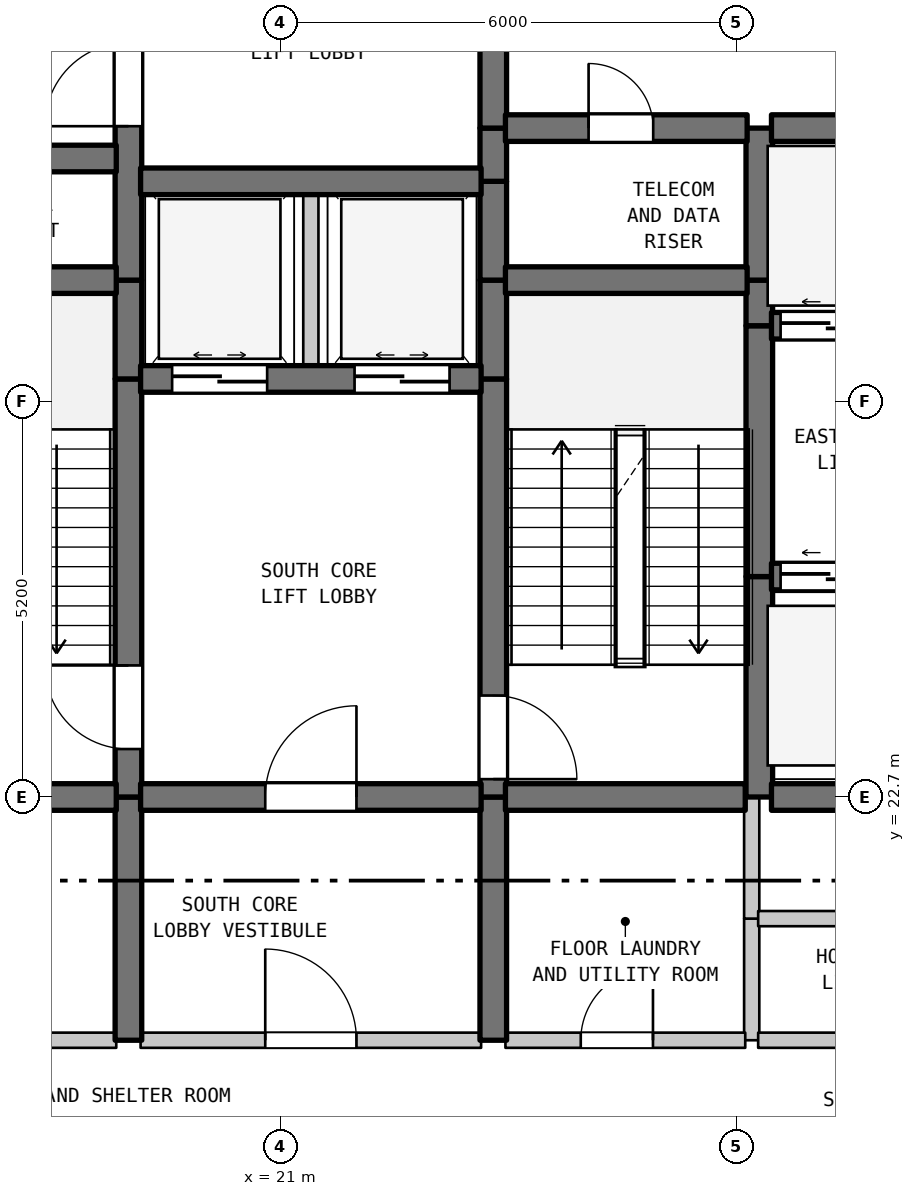
"""IFC4 building model, lengths in metres.
Left out: names, types, materials, properties, quantities, classifications, styles, units other than length and angle.
Written with IfcOpenShell. Run it as: python <this file> out.ifc"""

import sys

from ifc_helpers import new_model, si_unit, direction, frame, frame_2d, origin, place, context, subcontext, project, spatial, rectangle, extrude, element, fill, save


model = new_model("IFC4")
c1 = context("Model", 3, precision=1e-05, world=origin(), true_north=direction((0.0, 1.0)))
c2 = subcontext(c1, "Body", "Model", "MODEL_VIEW")
j1 = project(units=[si_unit("LENGTHUNIT", "METRE"), si_unit("PLANEANGLEUNIT", "RADIAN")], contexts=[c1])
p1 = place(None, origin())
s1 = spatial("IfcSite", under=j1, at=p1, CompositionType="ELEMENT")
p2 = place(p1, origin())
s2 = spatial("IfcBuilding", under=s1, at=p2, CompositionType="ELEMENT")
p3 = place(p2, frame((0.0, 0.0, 218.0)))
s3 = spatial("IfcBuildingStorey", under=s2, at=p3, CompositionType="ELEMENT", Elevation=218.0)
p4 = place(p3, frame((19.0, 19.5, 0.0), z_axis=(0.0, 0.0, 1.0), x_axis=(0.0, 1.0, 0.0)))
e1 = element("IfcWall", 1, at=p4, inside=s3, PredefinedType="SHEAR", context=c2, shape_type="SweptSolid", body=[
    extrude(rectangle(XDim=3.2, YDim=0.35, at=frame_2d((1.6, 0.0))), origin(), (0.0, 0.0, 1.0), 4.49),
])
p5 = place(p3, frame((19.0, 22.7, 0.0), z_axis=(0.0, 0.0, 1.0), x_axis=(0.0, 1.0, 0.0)))
e2 = element("IfcWall", 2, at=p5, inside=s3, PredefinedType="SHEAR", context=c2, shape_type="SweptSolid", body=[
    extrude(rectangle(XDim=5.5, YDim=0.35, at=frame_2d((2.75, 0.0))), origin(), (0.0, 0.0, 1.0), 4.49),
])
p6 = place(p5, frame((0.631, 0.0, 0.0)))
e3 = element("IfcOpeningElement", 3, at=p6, cuts=e2, PredefinedType="OPENING", context=c2, shape_type="SweptSolid", body=[
    extrude(rectangle(XDim=1.1, YDim=2.15, at=frame_2d((0.55, 1.075))), frame((0.0, 0.185, 0.0), z_axis=(0.0, -1.0, 0.0), x_axis=(1.0, 0.0, 0.0)), (0.0, 0.0, 1.0), 0.37),
])
p7 = place(p3, frame((19.0, 28.2, 0.0), z_axis=(0.0, 0.0, 1.0), x_axis=(0.0, 1.0, 0.0)))
e4 = element("IfcWall", 4, at=p7, inside=s3, PredefinedType="SHEAR", context=c2, shape_type="SweptSolid", body=[
    extrude(rectangle(XDim=1.3, YDim=0.35, at=frame_2d((0.65, 0.0))), origin(), (0.0, 0.0, 1.0), 4.49),
])
p8 = place(p3, frame((19.0, 29.5, 0.0), z_axis=(0.0, 0.0, 1.0), x_axis=(0.0, 1.0, 0.0)))
e5 = element("IfcWall", 5, at=p8, inside=s3, PredefinedType="SHEAR", context=c2, shape_type="SweptSolid", body=[
    extrude(rectangle(XDim=5.5, YDim=0.35, at=frame_2d((2.75, 0.0))), origin(), (0.0, 0.0, 1.0), 4.49),
])
p9 = place(p8, frame((2.025, 0.0, 0.0)))
e6 = element("IfcOpeningElement", 6, at=p9, cuts=e5, PredefinedType="OPENING", context=c2, shape_type="SweptSolid", body=[
    extrude(rectangle(XDim=1.1, YDim=2.15, at=frame_2d((0.55, 1.075))), frame((0.0, 0.185, 0.0), z_axis=(0.0, -1.0, 0.0), x_axis=(1.0, 0.0, 0.0)), (0.0, 0.0, 1.0), 0.37),
])
p10 = place(p3, frame((21.4, 28.2, 0.0), z_axis=(0.0, 0.0, 1.0), x_axis=(0.0, 1.0, 0.0)))
e7 = element("IfcWall", 7, at=p10, inside=s3, PredefinedType="STANDARD", context=c2, shape_type="SweptSolid", body=[
    extrude(rectangle(XDim=2.6, YDim=0.2, at=frame_2d((1.3, 0.0))), origin(), (0.0, 0.0, 1.0), 4.49),
])
p11 = place(p3, frame((23.8, 19.5, 0.0), z_axis=(0.0, 0.0, 1.0), x_axis=(0.0, 1.0, 0.0)))
e8 = element("IfcWall", 8, at=p11, inside=s3, PredefinedType="SHEAR", context=c2, shape_type="SweptSolid", body=[
    extrude(rectangle(XDim=3.2, YDim=0.35, at=frame_2d((1.6, 0.0))), origin(), (0.0, 0.0, 1.0), 4.49),
])
p12 = place(p3, frame((23.8, 22.7, 0.0), z_axis=(0.0, 0.0, 1.0), x_axis=(0.0, 1.0, 0.0)))
e9 = element("IfcWall", 9, at=p12, inside=s3, PredefinedType="SHEAR", context=c2, shape_type="SweptSolid", body=[
    extrude(rectangle(XDim=5.5, YDim=0.35, at=frame_2d((2.75, 0.0))), origin(), (0.0, 0.0, 1.0), 4.49),
])
p13 = place(p12, frame((0.235, 0.0, 0.0)))
e10 = element("IfcOpeningElement", 10, at=p13, cuts=e9, PredefinedType="OPENING", context=c2, shape_type="SweptSolid", body=[
    extrude(rectangle(XDim=1.1, YDim=2.15, at=frame_2d((0.55, 1.075))), frame((0.0, 0.185, 0.0), z_axis=(0.0, -1.0, 0.0), x_axis=(1.0, 0.0, 0.0)), (0.0, 0.0, 1.0), 0.37),
])
for number, where, z_axis, x_axis in (
    (11, (23.8, 28.2, 0.0), (0.0, 0.0, 1.0), (0.0, 1.0, 0.0)),
    (12, (23.8, 29.5, 0.0), (0.0, 0.0, 1.0), (0.0, 1.0, 0.0)),
):
    element("IfcWall", number, at=place(p3, frame(where, z_axis=z_axis, x_axis=x_axis)), inside=s3, PredefinedType="SHEAR", context=c2, shape_type="SweptSolid", body=[
        extrude(rectangle(XDim=1.3, YDim=0.35, at=frame_2d((0.65, 0.0))), origin(), (0.0, 0.0, 1.0), 4.49),
    ])
p14 = place(p3, frame((23.8, 30.8, 0.0), z_axis=(0.0, 0.0, 1.0), x_axis=(0.0, 1.0, 0.0)))
e13 = element("IfcWall", 13, at=p14, inside=s3, PredefinedType="SHEAR", context=c2, shape_type="SweptSolid", body=[
    extrude(rectangle(XDim=0.7, YDim=0.35, at=frame_2d((0.35, 0.0))), origin(), (0.0, 0.0, 1.0), 4.49),
])
p15 = place(p3, frame((23.8, 31.5, 0.0), z_axis=(0.0, 0.0, 1.0), x_axis=(0.0, 1.0, 0.0)))
e14 = element("IfcWall", 14, at=p15, inside=s3, PredefinedType="SHEAR", context=c2, shape_type="SweptSolid", body=[
    extrude(rectangle(XDim=3.5, YDim=0.35, at=frame_2d((1.75, 0.0))), origin(), (0.0, 0.0, 1.0), 4.49),
])
p16 = place(p15, frame((1.127, 0.0, 0.0)))
e15 = element("IfcOpeningElement", 15, at=p16, cuts=e14, PredefinedType="OPENING", context=c2, shape_type="SweptSolid", body=[
    extrude(rectangle(XDim=1.1, YDim=2.15, at=frame_2d((0.55, 1.075))), frame((0.0, 0.185, 0.0), z_axis=(0.0, -1.0, 0.0), x_axis=(1.0, 0.0, 0.0)), (0.0, 0.0, 1.0), 0.37),
])
p17 = place(p3, frame((27.2, 19.5, 0.0), z_axis=(0.0, 0.0, 1.0), x_axis=(0.0, 1.0, 0.0)))
e16 = element("IfcWall", 16, at=p17, inside=s3, PredefinedType="STANDARD", context=c2, shape_type="SweptSolid", body=[
    extrude(rectangle(XDim=1.6, YDim=0.2, at=frame_2d((0.8, 0.0))), origin(), (0.0, 0.0, 1.0), 4.49),
])
p18 = place(p3, frame((27.2, 21.1, 0.0), z_axis=(0.0, 0.0, 1.0), x_axis=(0.0, 1.0, 0.0)))
e17 = element("IfcWall", 17, at=p18, inside=s3, PredefinedType="STANDARD", context=c2, shape_type="SweptSolid", body=[
    extrude(rectangle(XDim=1.6, YDim=0.2, at=frame_2d((0.8, 0.0))), origin(), (0.0, 0.0, 1.0), 4.49),
])
p19 = place(p3, frame((27.3, 22.7, 0.0), z_axis=(0.0, 0.0, 1.0), x_axis=(0.0, 1.0, 0.0)))
e18 = element("IfcWall", 18, at=p19, inside=s3, PredefinedType="SHEAR", context=c2, shape_type="SweptSolid", body=[
    extrude(rectangle(XDim=2.9, YDim=0.35, at=frame_2d((1.45, 0.0))), origin(), (0.0, 0.0, 1.0), 4.49),
])
p20 = place(p3, frame((27.3, 25.6, 0.0), z_axis=(0.0, 0.0, 1.0), x_axis=(0.0, 1.0, 0.0)))
e19 = element("IfcWall", 19, at=p20, inside=s3, PredefinedType="SHEAR", context=c2, shape_type="SweptSolid", body=[
    extrude(rectangle(XDim=3.3, YDim=0.35, at=frame_2d((1.65, 0.0))), origin(), (0.0, 0.0, 1.0), 4.49),
])
p21 = place(p3, frame((27.3, 28.9, 0.0), z_axis=(0.0, 0.0, 1.0), x_axis=(0.0, 1.0, 0.0)))
e20 = element("IfcWall", 20, at=p21, inside=s3, PredefinedType="SHEAR", context=c2, shape_type="SweptSolid", body=[
    extrude(rectangle(XDim=0.6, YDim=0.35, at=frame_2d((0.3, 0.0))), origin(), (0.0, 0.0, 1.0), 4.49),
])
p22 = place(p3, frame((27.3, 29.5, 0.0), z_axis=(0.0, 0.0, 1.0), x_axis=(0.0, 1.0, 0.0)))
e21 = element("IfcWall", 21, at=p22, inside=s3, PredefinedType="SHEAR", context=c2, shape_type="SweptSolid", body=[
    extrude(rectangle(XDim=2.0, YDim=0.35, at=frame_2d((1.0, 0.0))), origin(), (0.0, 0.0, 1.0), 4.49),
])
p23 = place(p3, frame((15.16, 19.5, 0.0), z_axis=(0.0, 0.0, 1.0), x_axis=(1.0, 0.0, 0.0)))
e22 = element("IfcWall", 22, at=p23, inside=s3, PredefinedType="STANDARD", context=c2, shape_type="SweptSolid", body=[
    extrude(rectangle(XDim=3.68, YDim=0.2, at=frame_2d((1.84, 0.0))), origin(), (0.0, 0.0, 1.0), 4.49),
])
p24 = place(p23, frame((1.39, 0.0, 0.0)))
e23 = element("IfcOpeningElement", 23, at=p24, cuts=e22, PredefinedType="OPENING", context=c2, shape_type="SweptSolid", body=[
    extrude(rectangle(XDim=0.9, YDim=2.15, at=frame_2d((0.45, 1.075))), frame((0.0, 0.11, 0.0), z_axis=(0.0, -1.0, 0.0), x_axis=(1.0, 0.0, 0.0)), (0.0, 0.0, 1.0), 0.22),
])
p25 = place(p3, frame((19.16, 19.5, 0.0), z_axis=(0.0, 0.0, 1.0), x_axis=(1.0, 0.0, 0.0)))
e24 = element("IfcWall", 24, at=p25, inside=s3, PredefinedType="STANDARD", context=c2, shape_type="SweptSolid", body=[
    extrude(rectangle(XDim=4.48, YDim=0.2, at=frame_2d((2.24, 0.0))), origin(), (0.0, 0.0, 1.0), 4.49),
])
p26 = place(p25, frame((1.64, 0.0, 0.0)))
e25 = element("IfcOpeningElement", 25, at=p26, cuts=e24, PredefinedType="OPENING", context=c2, shape_type="SweptSolid", body=[
    extrude(rectangle(XDim=1.2, YDim=2.2, at=frame_2d((0.6, 1.1))), frame((0.0, 0.11, 0.0), z_axis=(0.0, -1.0, 0.0), x_axis=(1.0, 0.0, 0.0)), (0.0, 0.0, 1.0), 0.22),
])
p27 = place(p3, frame((23.96, 19.5, 0.0), z_axis=(0.0, 0.0, 1.0), x_axis=(1.0, 0.0, 0.0)))
e26 = element("IfcWall", 26, at=p27, inside=s3, PredefinedType="STANDARD", context=c2, shape_type="SweptSolid", body=[
    extrude(rectangle(XDim=3.155, YDim=0.2, at=frame_2d((1.578, 0.0))), origin(), (0.0, 0.0, 1.0), 4.49),
])
p28 = place(p27, frame((0.991, 0.0, 0.0)))
e27 = element("IfcOpeningElement", 27, at=p28, cuts=e26, PredefinedType="OPENING", context=c2, shape_type="SweptSolid", body=[
    extrude(rectangle(XDim=0.95, YDim=2.15, at=frame_2d((0.475, 1.075))), frame((0.0, 0.11, 0.0), z_axis=(0.0, -1.0, 0.0), x_axis=(1.0, 0.0, 0.0)), (0.0, 0.0, 1.0), 0.22),
])
p29 = place(p3, frame((27.285, 19.5, 0.0), z_axis=(0.0, 0.0, 1.0), x_axis=(1.0, 0.0, 0.0)))
e28 = element("IfcWall", 28, at=p29, inside=s3, PredefinedType="STANDARD", context=c2, shape_type="SweptSolid", body=[
    extrude(rectangle(XDim=3.43, YDim=0.2, at=frame_2d((1.715, 0.0))), origin(), (0.0, 0.0, 1.0), 4.49),
])
p30 = place(p29, frame((1.192, 0.0, 0.0)))
e29 = element("IfcOpeningElement", 29, at=p30, cuts=e28, PredefinedType="OPENING", context=c2, shape_type="SweptSolid", body=[
    extrude(rectangle(XDim=0.9, YDim=2.15, at=frame_2d((0.45, 1.075))), frame((0.0, 0.11, 0.0), z_axis=(0.0, -1.0, 0.0), x_axis=(1.0, 0.0, 0.0)), (0.0, 0.0, 1.0), 0.22),
])
p31 = place(p3, frame((27.285, 21.1, 0.0), z_axis=(0.0, 0.0, 1.0), x_axis=(1.0, 0.0, 0.0)))
e30 = element("IfcWall", 30, at=p31, inside=s3, PredefinedType="STANDARD", context=c2, shape_type="SweptSolid", body=[
    extrude(rectangle(XDim=3.355, YDim=0.2, at=frame_2d((1.677, 0.0))), origin(), (0.0, 0.0, 1.0), 4.49),
])
p32 = place(p3, frame((15.16, 22.7, 0.0), z_axis=(0.0, 0.0, 1.0), x_axis=(1.0, 0.0, 0.0)))
e31 = element("IfcWall", 31, at=p32, inside=s3, PredefinedType="SHEAR", context=c2, shape_type="SweptSolid", body=[
    extrude(rectangle(XDim=3.68, YDim=0.35, at=frame_2d((1.84, 0.0))), origin(), (0.0, 0.0, 1.0), 4.49),
])
p33 = place(p3, frame((19.16, 22.7, 0.0), z_axis=(0.0, 0.0, 1.0), x_axis=(1.0, 0.0, 0.0)))
e32 = element("IfcWall", 32, at=p33, inside=s3, PredefinedType="SHEAR", context=c2, shape_type="SweptSolid", body=[
    extrude(rectangle(XDim=4.48, YDim=0.35, at=frame_2d((2.24, 0.0))), origin(), (0.0, 0.0, 1.0), 4.49),
])
p34 = place(p33, frame((1.64, 0.0, 0.0)))
e33 = element("IfcOpeningElement", 33, at=p34, cuts=e32, PredefinedType="OPENING", context=c2, shape_type="SweptSolid", body=[
    extrude(rectangle(XDim=1.2, YDim=2.2, at=frame_2d((0.6, 1.1))), frame((0.0, 0.185, 0.0), z_axis=(0.0, -1.0, 0.0), x_axis=(1.0, 0.0, 0.0)), (0.0, 0.0, 1.0), 0.37),
])
p35 = place(p3, frame((23.96, 22.7, 0.0), z_axis=(0.0, 0.0, 1.0), x_axis=(1.0, 0.0, 0.0)))
e34 = element("IfcWall", 34, at=p35, inside=s3, PredefinedType="SHEAR", context=c2, shape_type="SweptSolid", body=[
    extrude(rectangle(XDim=3.155, YDim=0.35, at=frame_2d((1.578, 0.0))), origin(), (0.0, 0.0, 1.0), 4.49),
])
p36 = place(p3, frame((27.46, 22.7, 0.0), z_axis=(0.0, 0.0, 1.0), x_axis=(1.0, 0.0, 0.0)))
e35 = element("IfcWall", 35, at=p36, inside=s3, PredefinedType="SHEAR", context=c2, shape_type="SweptSolid", body=[
    extrude(rectangle(XDim=3.18, YDim=0.35, at=frame_2d((1.59, 0.0))), origin(), (0.0, 0.0, 1.0), 4.49),
])
p37 = place(p3, frame((27.46, 25.6, 0.0), z_axis=(0.0, 0.0, 1.0), x_axis=(1.0, 0.0, 0.0)))
e36 = element("IfcWall", 36, at=p37, inside=s3, PredefinedType="SHEAR", context=c2, shape_type="SweptSolid", body=[
    extrude(rectangle(XDim=3.18, YDim=0.35, at=frame_2d((1.59, 0.0))), origin(), (0.0, 0.0, 1.0), 4.49),
])
p38 = place(p37, frame((0.12, 0.0, 0.0)))
e37 = element("IfcOpeningElement", 37, at=p38, cuts=e36, PredefinedType="OPENING", context=c2, shape_type="SweptSolid", body=[
    extrude(rectangle(XDim=1.25, YDim=2.2, at=frame_2d((0.625, 1.1))), frame((0.0, 0.185, 0.0), z_axis=(0.0, -1.0, 0.0), x_axis=(1.0, 0.0, 0.0)), (0.0, 0.0, 1.0), 0.37),
])
p39 = place(p37, frame((1.81, 0.0, 0.0)))
e38 = element("IfcOpeningElement", 38, at=p39, cuts=e36, PredefinedType="OPENING", context=c2, shape_type="SweptSolid", body=[
    extrude(rectangle(XDim=1.25, YDim=2.2, at=frame_2d((0.625, 1.1))), frame((0.0, 0.185, 0.0), z_axis=(0.0, -1.0, 0.0), x_axis=(1.0, 0.0, 0.0)), (0.0, 0.0, 1.0), 0.37),
])
p40 = place(p3, frame((19.16, 28.2, 0.0), z_axis=(0.0, 0.0, 1.0), x_axis=(1.0, 0.0, 0.0)))
e39 = element("IfcWall", 39, at=p40, inside=s3, PredefinedType="SHEAR", context=c2, shape_type="SweptSolid", body=[
    extrude(rectangle(XDim=4.48, YDim=0.35, at=frame_2d((2.24, 0.0))), origin(), (0.0, 0.0, 1.0), 4.49),
])
p41 = place(p40, frame((0.415, 0.0, 0.0)))
e40 = element("IfcOpeningElement", 40, at=p41, cuts=e39, PredefinedType="OPENING", context=c2, shape_type="SweptSolid", body=[
    extrude(rectangle(XDim=1.25, YDim=2.2, at=frame_2d((0.625, 1.1))), frame((0.0, 0.185, 0.0), z_axis=(0.0, -1.0, 0.0), x_axis=(1.0, 0.0, 0.0)), (0.0, 0.0, 1.0), 0.37),
])
p42 = place(p40, frame((2.815, 0.0, 0.0)))
e41 = element("IfcOpeningElement", 41, at=p42, cuts=e39, PredefinedType="OPENING", context=c2, shape_type="SweptSolid", body=[
    extrude(rectangle(XDim=1.25, YDim=2.2, at=frame_2d((0.625, 1.1))), frame((0.0, 0.185, 0.0), z_axis=(0.0, -1.0, 0.0), x_axis=(1.0, 0.0, 0.0)), (0.0, 0.0, 1.0), 0.37),
])
p43 = place(p3, frame((27.46, 28.9, 0.0), z_axis=(0.0, 0.0, 1.0), x_axis=(1.0, 0.0, 0.0)))
e42 = element("IfcWall", 42, at=p43, inside=s3, PredefinedType="SHEAR", context=c2, shape_type="SweptSolid", body=[
    extrude(rectangle(XDim=3.18, YDim=0.35, at=frame_2d((1.59, 0.0))), origin(), (0.0, 0.0, 1.0), 4.49),
])
p44 = place(p43, frame((0.12, 0.0, 0.0)))
e43 = element("IfcOpeningElement", 43, at=p44, cuts=e42, PredefinedType="OPENING", context=c2, shape_type="SweptSolid", body=[
    extrude(rectangle(XDim=1.25, YDim=2.2, at=frame_2d((0.625, 1.1))), frame((0.0, 0.185, 0.0), z_axis=(0.0, -1.0, 0.0), x_axis=(1.0, 0.0, 0.0)), (0.0, 0.0, 1.0), 0.37),
])
p45 = place(p43, frame((1.81, 0.0, 0.0)))
e44 = element("IfcOpeningElement", 44, at=p45, cuts=e42, PredefinedType="OPENING", context=c2, shape_type="SweptSolid", body=[
    extrude(rectangle(XDim=1.25, YDim=2.2, at=frame_2d((0.625, 1.1))), frame((0.0, 0.185, 0.0), z_axis=(0.0, -1.0, 0.0), x_axis=(1.0, 0.0, 0.0)), (0.0, 0.0, 1.0), 0.37),
])
p46 = place(p3, frame((15.16, 29.5, 0.0), z_axis=(0.0, 0.0, 1.0), x_axis=(1.0, 0.0, 0.0)))
e45 = element("IfcWall", 45, at=p46, inside=s3, PredefinedType="SHEAR", context=c2, shape_type="SweptSolid", body=[
    extrude(rectangle(XDim=3.68, YDim=0.35, at=frame_2d((1.84, 0.0))), origin(), (0.0, 0.0, 1.0), 4.49),
])
p47 = place(p3, frame((23.96, 29.5, 0.0), z_axis=(0.0, 0.0, 1.0), x_axis=(1.0, 0.0, 0.0)))
e46 = element("IfcWall", 46, at=p47, inside=s3, PredefinedType="SHEAR", context=c2, shape_type="SweptSolid", body=[
    extrude(rectangle(XDim=3.18, YDim=0.35, at=frame_2d((1.59, 0.0))), origin(), (0.0, 0.0, 1.0), 4.49),
])
p48 = place(p3, frame((19.16, 30.8, 0.0), z_axis=(0.0, 0.0, 1.0), x_axis=(1.0, 0.0, 0.0)))
e47 = element("IfcWall", 47, at=p48, inside=s3, PredefinedType="SHEAR", context=c2, shape_type="SweptSolid", body=[
    extrude(rectangle(XDim=4.48, YDim=0.35, at=frame_2d((2.24, 0.0))), origin(), (0.0, 0.0, 1.0), 4.49),
])
p49 = place(p3, frame((15.16, 31.1, 0.0), z_axis=(0.0, 0.0, 1.0), x_axis=(1.0, 0.0, 0.0)))
e48 = element("IfcWall", 48, at=p49, inside=s3, PredefinedType="SHEAR", context=c2, shape_type="SweptSolid", body=[
    extrude(rectangle(XDim=3.68, YDim=0.35, at=frame_2d((1.84, 0.0))), origin(), (0.0, 0.0, 1.0), 4.49),
])
p50 = place(p3, frame((23.96, 31.5, 0.0), z_axis=(0.0, 0.0, 1.0), x_axis=(1.0, 0.0, 0.0)))
e49 = element("IfcWall", 49, at=p50, inside=s3, PredefinedType="SHEAR", context=c2, shape_type="SweptSolid", body=[
    extrude(rectangle(XDim=3.18, YDim=0.35, at=frame_2d((1.59, 0.0))), origin(), (0.0, 0.0, 1.0), 4.49),
])
p51 = place(p50, frame((1.094, 0.0, 0.0)))
e50 = element("IfcOpeningElement", 50, at=p51, cuts=e49, PredefinedType="OPENING", context=c2, shape_type="SweptSolid", body=[
    extrude(rectangle(XDim=0.85, YDim=2.1, at=frame_2d((0.425, 1.05))), frame((0.0, 0.185, 0.0), z_axis=(0.0, -1.0, 0.0), x_axis=(1.0, 0.0, 0.0)), (0.0, 0.0, 1.0), 0.37),
])
p52 = place(p3, frame((27.46, 31.5, 0.0), z_axis=(0.0, 0.0, 1.0), x_axis=(1.0, 0.0, 0.0)))
e51 = element("IfcWall", 51, at=p52, inside=s3, PredefinedType="SHEAR", context=c2, shape_type="SweptSolid", body=[
    extrude(rectangle(XDim=3.18, YDim=0.35, at=frame_2d((1.59, 0.0))), origin(), (0.0, 0.0, 1.0), 4.49),
])
p53 = place(p6, origin())
e52 = element("IfcDoor", 52, at=p53, inside=s3, OperationType="SINGLE_SWING_RIGHT", PredefinedType="DOOR", context=c2, shape_type="SweptSolid", body=[
    extrude(rectangle(XDim=1.1, YDim=2.15, at=frame_2d((0.55, 1.075))), frame((0.0, 0.025, 0.0), z_axis=(0.0, -1.0, 0.0), x_axis=(1.0, 0.0, 0.0)), (0.0, 0.0, 1.0), 0.05),
])
fill(e3, e52)
p54 = place(p9, origin())
e53 = element("IfcDoor", 53, at=p54, inside=s3, OperationType="SINGLE_SWING_LEFT", PredefinedType="DOOR", context=c2, shape_type="SweptSolid", body=[
    extrude(rectangle(XDim=1.1, YDim=2.15, at=frame_2d((0.55, 1.075))), frame((0.0, 0.025, 0.0), z_axis=(0.0, -1.0, 0.0), x_axis=(1.0, 0.0, 0.0)), (0.0, 0.0, 1.0), 0.05),
])
fill(e6, e53)
p55 = place(p13, frame((1.1, 0.0, 0.0), z_axis=(0.0, 0.0, 1.0), x_axis=(-1.0, 0.0, 0.0)))
e54 = element("IfcDoor", 54, at=p55, inside=s3, OperationType="SINGLE_SWING_LEFT", PredefinedType="DOOR", context=c2, shape_type="SweptSolid", body=[
    extrude(rectangle(XDim=1.1, YDim=2.15, at=frame_2d((0.55, 1.075))), frame((0.0, 0.025, 0.0), z_axis=(0.0, -1.0, 0.0), x_axis=(1.0, 0.0, 0.0)), (0.0, 0.0, 1.0), 0.05),
])
fill(e10, e54)
p56 = place(p26, origin())
e55 = element("IfcDoor", 55, at=p56, inside=s3, OperationType="SINGLE_SWING_LEFT", PredefinedType="DOOR", context=c2, shape_type="SweptSolid", body=[
    extrude(rectangle(XDim=1.2, YDim=2.2, at=frame_2d((0.6, 1.1))), frame((0.0, 0.025, 0.0), z_axis=(0.0, -1.0, 0.0), x_axis=(1.0, 0.0, 0.0)), (0.0, 0.0, 1.0), 0.05),
])
fill(e25, e55)
p57 = place(p28, origin())
e56 = element("IfcDoor", 56, at=p57, inside=s3, OperationType="SINGLE_SWING_RIGHT", PredefinedType="DOOR", context=c2, shape_type="SweptSolid", body=[
    extrude(rectangle(XDim=0.95, YDim=2.15, at=frame_2d((0.475, 1.075))), frame((0.0, 0.025, 0.0), z_axis=(0.0, -1.0, 0.0), x_axis=(1.0, 0.0, 0.0)), (0.0, 0.0, 1.0), 0.05),
])
fill(e27, e56)
p58 = place(p34, origin())
e57 = element("IfcDoor", 57, at=p58, inside=s3, OperationType="SINGLE_SWING_RIGHT", PredefinedType="DOOR", context=c2, shape_type="SweptSolid", body=[
    extrude(rectangle(XDim=1.2, YDim=2.2, at=frame_2d((0.6, 1.1))), frame((0.0, 0.025, 0.0), z_axis=(0.0, -1.0, 0.0), x_axis=(1.0, 0.0, 0.0)), (0.0, 0.0, 1.0), 0.05),
])
fill(e33, e57)
p59 = place(p38, origin())
e58 = element("IfcDoor", 58, at=p59, inside=s3, OperationType="DOUBLE_DOOR_SLIDING", PredefinedType="DOOR", context=c2, shape_type="SweptSolid", body=[
    extrude(rectangle(XDim=1.25, YDim=2.2, at=frame_2d((0.625, 1.1))), frame((0.0, 0.025, 0.0), z_axis=(0.0, -1.0, 0.0), x_axis=(1.0, 0.0, 0.0)), (0.0, 0.0, 1.0), 0.05),
])
fill(e37, e58)
p60 = place(p41, origin())
e59 = element("IfcDoor", 59, at=p60, inside=s3, OperationType="DOUBLE_DOOR_SLIDING", PredefinedType="DOOR", context=c2, shape_type="SweptSolid", body=[
    extrude(rectangle(XDim=1.25, YDim=2.2, at=frame_2d((0.625, 1.1))), frame((0.0, 0.025, 0.0), z_axis=(0.0, -1.0, 0.0), x_axis=(1.0, 0.0, 0.0)), (0.0, 0.0, 1.0), 0.05),
])
fill(e40, e59)
p61 = place(p42, origin())
e60 = element("IfcDoor", 60, at=p61, inside=s3, OperationType="DOUBLE_DOOR_SLIDING", PredefinedType="DOOR", context=c2, shape_type="SweptSolid", body=[
    extrude(rectangle(XDim=1.25, YDim=2.2, at=frame_2d((0.625, 1.1))), frame((0.0, 0.025, 0.0), z_axis=(0.0, -1.0, 0.0), x_axis=(1.0, 0.0, 0.0)), (0.0, 0.0, 1.0), 0.05),
])
fill(e41, e60)
p62 = place(p44, origin())
e61 = element("IfcDoor", 61, at=p62, inside=s3, OperationType="DOUBLE_DOOR_SLIDING", PredefinedType="DOOR", context=c2, shape_type="SweptSolid", body=[
    extrude(rectangle(XDim=1.25, YDim=2.2, at=frame_2d((0.625, 1.1))), frame((0.0, 0.025, 0.0), z_axis=(0.0, -1.0, 0.0), x_axis=(1.0, 0.0, 0.0)), (0.0, 0.0, 1.0), 0.05),
])
fill(e43, e61)
p63 = place(p51, origin())
e62 = element("IfcDoor", 62, at=p63, inside=s3, OperationType="SINGLE_SWING_LEFT", PredefinedType="DOOR", context=c2, shape_type="SweptSolid", body=[
    extrude(rectangle(XDim=0.85, YDim=2.1, at=frame_2d((0.425, 1.05))), frame((0.0, 0.025, 0.0), z_axis=(0.0, -1.0, 0.0), x_axis=(1.0, 0.0, 0.0)), (0.0, 0.0, 1.0), 0.05),
])
fill(e50, e62)
save(model, sys.argv[1])
